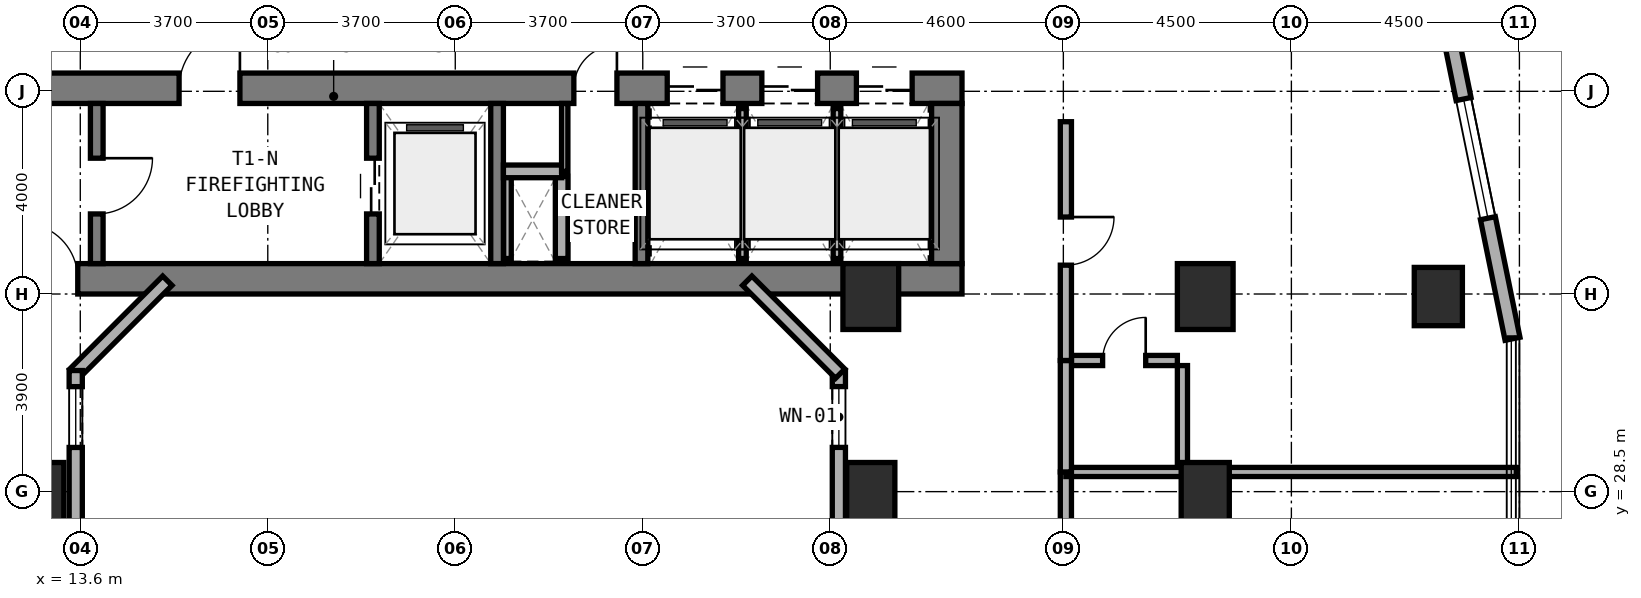
"""IFC4 building model, lengths in metres.
Left out: names, types, materials, properties, quantities, classifications, styles, units other than length and angle.
Written with IfcOpenShell. Run it as: python <this file> out.ifc"""

import sys

from ifc_helpers import new_model, si_unit, direction, frame, frame_2d, origin, origin_2d, place, context, subcontext, project, spatial, rectangle, extrude, element, fill, save


model = new_model("IFC4")
c1 = context("Model", 3, precision=1e-05, world=origin(), true_north=direction((0.0, 1.0)))
c2 = subcontext(c1, "Body", "Model", "MODEL_VIEW")
j1 = project(units=[si_unit("LENGTHUNIT", "METRE"), si_unit("PLANEANGLEUNIT", "RADIAN")], contexts=[c1])
p1 = place(None, origin())
s1 = spatial("IfcSite", under=j1, at=p1, CompositionType="ELEMENT")
p2 = place(p1, origin())
s2 = spatial("IfcBuilding", under=s1, at=p2, CompositionType="ELEMENT")
p3 = place(p2, frame((0.0, 0.0, 48.5)))
s3 = spatial("IfcBuildingStorey", under=s2, at=p3, CompositionType="ELEMENT", Elevation=48.5)
p4 = place(p3, frame((6.2, 32.7, 0.0), z_axis=(0.0, 0.0, 1.0), x_axis=(1.0, 0.0, 0.0)))
e1 = element("IfcWall", 1, at=p4, inside=s3, PredefinedType="SHEAR", context=c2, shape_type="SweptSolid", body=[
    extrude(rectangle(XDim=24.8, YDim=0.6, at=frame_2d((12.4, 0.0))), origin(), (0.0, 0.0, 1.0), 3.5),
])
p5 = place(p4, frame((6.25, 0.0, 0.0)))
e2 = element("IfcOpeningElement", 2, at=p5, cuts=e1, PredefinedType="OPENING", context=c2, shape_type="SweptSolid", body=[
    extrude(rectangle(XDim=1.1, YDim=2.15, at=frame_2d((0.55, 1.075))), frame((0.0, 0.31, 0.0), z_axis=(0.0, -1.0, 0.0), x_axis=(1.0, 0.0, 0.0)), (0.0, 0.0, 1.0), 0.62),
])
p6 = place(p3, frame((6.2, 36.46, 0.0), z_axis=(0.0, 0.0, 1.0), x_axis=(1.0, 0.0, 0.0)))
e3 = element("IfcWall", 3, at=p6, inside=s3, PredefinedType="SHEAR", context=c2, shape_type="SweptSolid", body=[
    extrude(rectangle(XDim=24.8, YDim=0.6, at=frame_2d((12.4, 0.0))), origin(), (0.0, 0.0, 1.0), 3.5),
])
p7 = place(p6, frame((9.35, 0.0, 0.0)))
e4 = element("IfcOpeningElement", 4, at=p7, cuts=e3, PredefinedType="OPENING", context=c2, shape_type="SweptSolid", body=[
    extrude(rectangle(XDim=1.2, YDim=2.15, at=frame_2d((0.6, 1.075))), frame((0.0, 0.31, 0.0), z_axis=(0.0, -1.0, 0.0), x_axis=(1.0, 0.0, 0.0)), (0.0, 0.0, 1.0), 0.62),
])
p8 = place(p6, frame((17.14, 0.0, 0.0)))
e5 = element("IfcOpeningElement", 5, at=p8, cuts=e3, PredefinedType="OPENING", context=c2, shape_type="SweptSolid", body=[
    extrude(rectangle(XDim=0.85, YDim=2.1, at=frame_2d((0.425, 1.05))), frame((0.0, 0.31, 0.0), z_axis=(0.0, -1.0, 0.0), x_axis=(1.0, 0.0, 0.0)), (0.0, 0.0, 1.0), 0.62),
])
p9 = place(p6, frame((18.983, 0.0, 0.0)))
e6 = element("IfcOpeningElement", 6, at=p9, cuts=e3, PredefinedType="OPENING", context=c2, shape_type="SweptSolid", body=[
    extrude(rectangle(XDim=1.1, YDim=2.15, at=frame_2d((0.55, 1.075))), frame((0.0, 0.31, 0.0), z_axis=(0.0, -1.0, 0.0), x_axis=(1.0, 0.0, 0.0)), (0.0, 0.0, 1.0), 0.62),
])
p10 = place(p6, frame((20.85, 0.0, 0.0)))
e7 = element("IfcOpeningElement", 7, at=p10, cuts=e3, PredefinedType="OPENING", context=c2, shape_type="SweptSolid", body=[
    extrude(rectangle(XDim=1.1, YDim=2.15, at=frame_2d((0.55, 1.075))), frame((0.0, 0.31, 0.0), z_axis=(0.0, -1.0, 0.0), x_axis=(1.0, 0.0, 0.0)), (0.0, 0.0, 1.0), 0.62),
])
p11 = place(p6, frame((22.716, 0.0, 0.0)))
e8 = element("IfcOpeningElement", 8, at=p11, cuts=e3, PredefinedType="OPENING", context=c2, shape_type="SweptSolid", body=[
    extrude(rectangle(XDim=1.1, YDim=2.15, at=frame_2d((0.55, 1.075))), frame((0.0, 0.31, 0.0), z_axis=(0.0, -1.0, 0.0), x_axis=(1.0, 0.0, 0.0)), (0.0, 0.0, 1.0), 0.62),
])
p12 = place(p3, frame((30.7, 33.0, 0.0), z_axis=(0.0, 0.0, 1.0), x_axis=(0.0, 1.0, 0.0)))
e9 = element("IfcWall", 9, at=p12, inside=s3, PredefinedType="SHEAR", context=c2, shape_type="SweptSolid", body=[
    extrude(rectangle(XDim=3.16, YDim=0.6, at=frame_2d((1.58, 0.0))), origin(), (0.0, 0.0, 1.0), 3.5),
])
p13 = place(p3, frame((13.925, 33.0, 0.0), z_axis=(0.0, 0.0, 1.0), x_axis=(0.0, 1.0, 0.0)))
e10 = element("IfcWall", 10, at=p13, inside=s3, PredefinedType="STANDARD", context=c2, shape_type="SweptSolid", body=[
    extrude(rectangle(XDim=3.16, YDim=0.25, at=frame_2d((1.58, 0.0))), origin(), (0.0, 0.0, 1.0), 3.22),
])
p14 = place(p13, frame((0.98, 0.0, 0.0)))
e11 = element("IfcOpeningElement", 11, at=p14, cuts=e10, PredefinedType="OPENING", context=c2, shape_type="SweptSolid", body=[
    extrude(rectangle(XDim=1.1, YDim=2.15, at=frame_2d((0.55, 1.075))), frame((0.0, 0.135, 0.0), z_axis=(0.0, -1.0, 0.0), x_axis=(1.0, 0.0, 0.0)), (0.0, 0.0, 1.0), 0.27),
])
p15 = place(p3, frame((19.375, 33.0, 0.0), z_axis=(0.0, 0.0, 1.0), x_axis=(0.0, 1.0, 0.0)))
e12 = element("IfcWall", 12, at=p15, inside=s3, PredefinedType="STANDARD", context=c2, shape_type="SweptSolid", body=[
    extrude(rectangle(XDim=3.16, YDim=0.25, at=frame_2d((1.58, 0.0))), origin(), (0.0, 0.0, 1.0), 3.22),
])
p16 = place(p15, frame((0.98, 0.0, 0.0)))
e13 = element("IfcOpeningElement", 13, at=p16, cuts=e12, PredefinedType="OPENING", context=c2, shape_type="SweptSolid", body=[
    extrude(rectangle(XDim=1.1, YDim=2.15, at=frame_2d((0.55, 1.075))), frame((0.0, 0.135, 0.0), z_axis=(0.0, -1.0, 0.0), x_axis=(1.0, 0.0, 0.0)), (0.0, 0.0, 1.0), 0.27),
])
for number, where, z_axis, x_axis in (
    (14, (21.825, 33.0, 0.0), (0.0, 0.0, 1.0), (0.0, 1.0, 0.0)),
    (15, (24.675, 33.0, 0.0), (0.0, 0.0, 1.0), (0.0, 1.0, 0.0)),
):
    element("IfcWall", number, at=place(p3, frame(where, z_axis=z_axis, x_axis=x_axis)), inside=s3, PredefinedType="STANDARD", context=c2, shape_type="SweptSolid", body=[
        extrude(rectangle(XDim=3.16, YDim=0.25, at=frame_2d((1.58, 0.0))), origin(), (0.0, 0.0, 1.0), 3.22),
    ])
p17 = place(p3, frame((35.8, 28.5, 0.0), z_axis=(0.0, 0.0, 1.0), x_axis=(1.0, 0.0, 0.0)))
e16 = element("IfcColumn", 16, at=p17, inside=s3, PredefinedType="COLUMN", context=c2, shape_type="SweptSolid", body=[
    extrude(rectangle(XDim=0.95, YDim=1.15, at=origin_2d()), origin(), (0.0, 0.0, 1.0), 3.5),
])
p18 = place(p3, frame((35.8, 32.35, 0.0), z_axis=(0.0, 0.0, 1.0), x_axis=(1.0, 0.0, 0.0)))
e17 = element("IfcColumn", 17, at=p18, inside=s3, PredefinedType="COLUMN", context=c2, shape_type="SweptSolid", body=[
    extrude(rectangle(XDim=1.1, YDim=1.3, at=origin_2d()), origin(), (0.0, 0.0, 1.0), 3.5),
])
p19 = place(p3, frame((12.8, 28.5, 0.0), z_axis=(0.0, 0.0, 1.0), x_axis=(1.0, 0.0, 0.0)))
e18 = element("IfcColumn", 18, at=p19, inside=s3, PredefinedType="COLUMN", context=c2, shape_type="SweptSolid", body=[
    extrude(rectangle(XDim=0.95, YDim=1.15, at=origin_2d()), origin(), (0.0, 0.0, 1.0), 3.5),
])
p20 = place(p3, frame((29.2, 32.35, 0.0), z_axis=(0.0, 0.0, 1.0), x_axis=(1.0, 0.0, 0.0)))
e19 = element("IfcColumn", 19, at=p20, inside=s3, PredefinedType="COLUMN", context=c2, shape_type="SweptSolid", body=[
    extrude(rectangle(XDim=1.1, YDim=1.3, at=origin_2d()), origin(), (0.0, 0.0, 1.0), 3.5),
])
for number, where, z_axis, x_axis in (
    (20, (29.2, 28.5, 0.0), (0.0, 0.0, 1.0), (1.0, 0.0, 0.0)),
    (21, (40.4, 32.35, 0.0), (0.0, 0.0, 1.0), (1.0, 0.0, 0.0)),
):
    element("IfcColumn", number, at=place(p3, frame(where, z_axis=z_axis, x_axis=x_axis)), inside=s3, PredefinedType="COLUMN", context=c2, shape_type="SweptSolid", body=[
        extrude(rectangle(XDim=0.95, YDim=1.15, at=origin_2d()), origin(), (0.0, 0.0, 1.0), 3.5),
    ])
p21 = place(p3, frame((41.864, 31.516, 0.0), z_axis=(0.0, 0.0, 1.0), x_axis=(-0.199990901713, 0.979797754249, 0.0)))
e22 = element("IfcWall", 22, at=p21, inside=s3, PredefinedType="STANDARD", context=c2, shape_type="SweptSolid", body=[
    extrude(rectangle(XDim=10.065, YDim=0.3, at=frame_2d((5.033, 0.0))), origin(), (0.0, 0.0, 1.0), 3.22),
])
p22 = place(p21, frame((2.429, 0.0, 0.8)))
e23 = element("IfcOpeningElement", 23, at=p22, cuts=e22, PredefinedType="OPENING", context=c2, shape_type="SweptSolid", body=[
    extrude(rectangle(XDim=2.4, YDim=1.6, at=frame_2d((1.2, 0.8))), frame((0.0, 0.16, 0.0), z_axis=(0.0, -1.0, 0.0), x_axis=(1.0, 0.0, 0.0)), (0.0, 0.0, 1.0), 0.32),
])
p23 = place(p21, frame((7.887, 0.0, 0.85)))
e24 = element("IfcOpeningElement", 24, at=p23, cuts=e22, PredefinedType="OPENING", context=c2, shape_type="SweptSolid", body=[
    extrude(rectangle(XDim=1.8, YDim=1.5, at=frame_2d((0.9, 0.75))), frame((0.0, 0.16, 0.0), z_axis=(0.0, -1.0, 0.0), x_axis=(1.0, 0.0, 0.0)), (0.0, 0.0, 1.0), 0.32),
])
p24 = place(p3, frame((28.57, 19.11, 0.0), z_axis=(0.0, 0.0, 1.0), x_axis=(0.0, 1.0, 0.0)))
e25 = element("IfcWall", 25, at=p24, inside=s3, PredefinedType="STANDARD", context=c2, shape_type="SweptSolid", body=[
    extrude(rectangle(XDim=11.78, YDim=0.26, at=frame_2d((5.89, 0.0))), origin(), (0.0, 0.0, 1.0), 3.22),
])
p25 = place(p24, frame((0.318, 0.0, 0.85)))
e26 = element("IfcOpeningElement", 26, at=p25, cuts=e25, PredefinedType="OPENING", context=c2, shape_type="SweptSolid", body=[
    extrude(rectangle(XDim=1.2, YDim=1.5, at=frame_2d((0.6, 0.75))), frame((0.0, 0.14, 0.0), z_axis=(0.0, -1.0, 0.0), x_axis=(1.0, 0.0, 0.0)), (0.0, 0.0, 1.0), 0.28),
])
p26 = place(p24, frame((4.99, 0.0, 0.85)))
e27 = element("IfcOpeningElement", 27, at=p26, cuts=e25, PredefinedType="OPENING", context=c2, shape_type="SweptSolid", body=[
    extrude(rectangle(XDim=1.8, YDim=1.5, at=frame_2d((0.9, 0.75))), frame((0.0, 0.14, 0.0), z_axis=(0.0, -1.0, 0.0), x_axis=(1.0, 0.0, 0.0)), (0.0, 0.0, 1.0), 0.28),
])
p27 = place(p24, frame((10.263, 0.0, 0.85)))
e28 = element("IfcOpeningElement", 28, at=p27, cuts=e25, PredefinedType="OPENING", context=c2, shape_type="SweptSolid", body=[
    extrude(rectangle(XDim=1.2, YDim=1.5, at=frame_2d((0.6, 0.75))), frame((0.0, 0.14, 0.0), z_axis=(0.0, -1.0, 0.0), x_axis=(1.0, 0.0, 0.0)), (0.0, 0.0, 1.0), 0.28),
])
p28 = place(p3, frame((28.596, 30.828, 0.0), z_axis=(0.0, 0.0, 1.0), x_axis=(-0.707059717605, 0.707153841636, 0.0)))
e29 = element("IfcWall", 29, at=p28, inside=s3, PredefinedType="STANDARD", context=c2, shape_type="SweptSolid", body=[
    extrude(rectangle(XDim=2.594, YDim=0.26, at=frame_2d((1.297, 0.0))), origin(), (0.0, 0.0, 1.0), 3.22),
])
p29 = place(p3, frame((15.318, 32.662, 0.0), z_axis=(0.0, 0.0, 1.0), x_axis=(-0.707106781187, -0.707106781187, 0.0)))
e30 = element("IfcWall", 30, at=p29, inside=s3, PredefinedType="STANDARD", context=c2, shape_type="SweptSolid", body=[
    extrude(rectangle(XDim=2.594, YDim=0.26, at=frame_2d((1.297, 0.0))), origin(), (0.0, 0.0, 1.0), 3.22),
])
p30 = place(p3, frame((13.51, 30.89, 0.0), z_axis=(0.0, 0.0, 1.0), x_axis=(0.0, -1.0, 0.0)))
e31 = element("IfcWall", 31, at=p30, inside=s3, PredefinedType="STANDARD", context=c2, shape_type="SweptSolid", body=[
    extrude(rectangle(XDim=11.78, YDim=0.26, at=frame_2d((5.89, 0.0))), origin(), (0.0, 0.0, 1.0), 3.22),
])
p31 = place(p30, frame((0.318, 0.0, 0.85)))
e32 = element("IfcOpeningElement", 32, at=p31, cuts=e31, PredefinedType="OPENING", context=c2, shape_type="SweptSolid", body=[
    extrude(rectangle(XDim=1.2, YDim=1.5, at=frame_2d((0.6, 0.75))), frame((0.0, 0.14, 0.0), z_axis=(0.0, -1.0, 0.0), x_axis=(1.0, 0.0, 0.0)), (0.0, 0.0, 1.0), 0.28),
])
p32 = place(p30, frame((4.99, 0.0, 0.85)))
e33 = element("IfcOpeningElement", 33, at=p32, cuts=e31, PredefinedType="OPENING", context=c2, shape_type="SweptSolid", body=[
    extrude(rectangle(XDim=1.8, YDim=1.5, at=frame_2d((0.9, 0.75))), frame((0.0, 0.14, 0.0), z_axis=(0.0, -1.0, 0.0), x_axis=(1.0, 0.0, 0.0)), (0.0, 0.0, 1.0), 0.28),
])
p33 = place(p30, frame((10.263, 0.0, 0.85)))
e34 = element("IfcOpeningElement", 34, at=p33, cuts=e31, PredefinedType="OPENING", context=c2, shape_type="SweptSolid", body=[
    extrude(rectangle(XDim=1.2, YDim=1.5, at=frame_2d((0.6, 0.75))), frame((0.0, 0.14, 0.0), z_axis=(0.0, -1.0, 0.0), x_axis=(1.0, 0.0, 0.0)), (0.0, 0.0, 1.0), 0.28),
])
p34 = place(p3, frame((22.03, 33.1, 0.0), z_axis=(0.0, 0.0, 1.0), x_axis=(0.0, 1.0, 0.0)))
e35 = element("IfcWall", 35, at=p34, inside=s3, PredefinedType="PARTITIONING", context=c2, shape_type="SweptSolid", body=[
    extrude(rectangle(XDim=1.62, YDim=0.15, at=frame_2d((0.81, 0.0))), origin(), (0.0, 0.0, 1.0), 3.22),
])
p35 = place(p3, frame((23.1, 33.1, 0.0), z_axis=(0.0, 0.0, 1.0), x_axis=(0.0, 1.0, 0.0)))
e36 = element("IfcWall", 36, at=p35, inside=s3, PredefinedType="SOLIDWALL", context=c2, shape_type="SweptSolid", body=[
    extrude(rectangle(XDim=1.62, YDim=0.25, at=frame_2d((0.81, 0.0))), origin(), (0.0, 0.0, 1.0), 3.22),
])
p36 = place(p3, frame((21.95, 34.82, 0.0), z_axis=(0.0, 0.0, 1.0), x_axis=(1.0, 0.0, 0.0)))
e37 = element("IfcWall", 37, at=p36, inside=s3, PredefinedType="SOLIDWALL", context=c2, shape_type="SweptSolid", body=[
    extrude(rectangle(XDim=1.15, YDim=0.25, at=frame_2d((0.575, 0.0))), origin(), (0.0, 0.0, 1.0), 3.22),
])
p37 = place(p3, frame((23.16, 34.82, 0.0), z_axis=(0.0, 0.0, 1.0), x_axis=(0.0, 1.0, 0.0)))
e38 = element("IfcWall", 38, at=p37, inside=s3, PredefinedType="PARTITIONING", context=c2, shape_type="SweptSolid", body=[
    extrude(rectangle(XDim=1.34, YDim=0.125, at=frame_2d((0.67, 0.0))), origin(), (0.0, 0.0, 1.0), 3.22),
])
p38 = place(p3, frame((26.667, 33.1, 0.0), z_axis=(0.0, 0.0, 1.0), x_axis=(0.0, 1.0, 0.0)))
e39 = element("IfcWall", 39, at=p38, inside=s3, PredefinedType="PARTITIONING", context=c2, shape_type="SweptSolid", body=[
    extrude(rectangle(XDim=2.96, YDim=0.15, at=frame_2d((1.48, 0.0))), origin(), (0.0, 0.0, 1.0), 3.22),
])
p39 = place(p3, frame((28.533, 33.1, 0.0), z_axis=(0.0, 0.0, 1.0), x_axis=(0.0, 1.0, 0.0)))
e40 = element("IfcWall", 40, at=p39, inside=s3, PredefinedType="PARTITIONING", context=c2, shape_type="SweptSolid", body=[
    extrude(rectangle(XDim=2.96, YDim=0.15, at=frame_2d((1.48, 0.0))), origin(), (0.0, 0.0, 1.0), 2.395),
])
p40 = place(p3, frame((33.05, 23.744, 0.0), z_axis=(0.0, 0.0, 1.0), x_axis=(0.0, 1.0, 0.0)))
e41 = element("IfcWall", 41, at=p40, inside=s3, PredefinedType="SOLIDWALL", context=c2, shape_type="SweptSolid", body=[
    extrude(rectangle(XDim=5.144, YDim=0.22, at=frame_2d((2.572, 0.0))), origin(), (0.0, 0.0, 1.0), 2.395),
])
p41 = place(p40, frame((2.097, 0.0, 0.0)))
e42 = element("IfcOpeningElement", 42, at=p41, cuts=e41, PredefinedType="OPENING", context=c2, shape_type="SweptSolid", body=[
    extrude(rectangle(XDim=0.95, YDim=2.1, at=frame_2d((0.475, 1.05))), frame((0.0, 0.12, 0.0), z_axis=(0.0, -1.0, 0.0), x_axis=(1.0, 0.0, 0.0)), (0.0, 0.0, 1.0), 0.24),
])
p42 = place(p3, frame((33.05, 28.888, 0.0), z_axis=(0.0, 0.0, 1.0), x_axis=(1.0, 0.0, 0.0)))
e43 = element("IfcWall", 43, at=p42, inside=s3, PredefinedType="SOLIDWALL", context=c2, shape_type="SweptSolid", body=[
    extrude(rectangle(XDim=8.89, YDim=0.18, at=frame_2d((4.445, 0.0))), origin(), (0.0, 0.0, 1.0), 2.745),
])
p43 = place(p3, frame((33.15, 31.088, 0.0), z_axis=(0.0, 0.0, 1.0), x_axis=(1.0, 0.0, 0.0)))
e44 = element("IfcWall", 44, at=p43, inside=s3, PredefinedType="PLUMBINGWALL", context=c2, shape_type="SweptSolid", body=[
    extrude(rectangle(XDim=2.1, YDim=0.2, at=frame_2d((1.05, 0.0))), origin(), (0.0, 0.0, 1.0), 3.22),
])
p44 = place(p43, frame((0.625, 0.0, 0.0)))
e45 = element("IfcOpeningElement", 45, at=p44, cuts=e44, PredefinedType="OPENING", context=c2, shape_type="SweptSolid", body=[
    extrude(rectangle(XDim=0.85, YDim=2.1, at=frame_2d((0.425, 1.05))), frame((0.0, 0.11, 0.0), z_axis=(0.0, -1.0, 0.0), x_axis=(1.0, 0.0, 0.0)), (0.0, 0.0, 1.0), 0.22),
])
p45 = place(p3, frame((35.35, 28.988, 0.0), z_axis=(0.0, 0.0, 1.0), x_axis=(0.0, 1.0, 0.0)))
e46 = element("IfcWall", 46, at=p45, inside=s3, PredefinedType="PLUMBINGWALL", context=c2, shape_type="SweptSolid", body=[
    extrude(rectangle(XDim=2.0, YDim=0.2, at=frame_2d((1.0, 0.0))), origin(), (0.0, 0.0, 1.0), 3.22),
])
p46 = place(p3, frame((33.05, 28.888, 0.0), z_axis=(0.0, 0.0, 1.0), x_axis=(0.0, 1.0, 0.0)))
e47 = element("IfcWall", 47, at=p46, inside=s3, PredefinedType="SOLIDWALL", context=c2, shape_type="SweptSolid", body=[
    extrude(rectangle(XDim=2.2, YDim=0.22, at=frame_2d((1.1, 0.0))), origin(), (0.0, 0.0, 1.0), 3.22),
])
p47 = place(p3, frame((33.05, 31.088, 0.0), z_axis=(0.0, 0.0, 1.0), x_axis=(0.0, 1.0, 0.0)))
e48 = element("IfcWall", 48, at=p47, inside=s3, PredefinedType="SOLIDWALL", context=c2, shape_type="SweptSolid", body=[
    extrude(rectangle(XDim=4.712, YDim=0.22, at=frame_2d((2.356, 0.0))), origin(), (0.0, 0.0, 1.0), 2.395),
])
p48 = place(p47, frame((1.881, 0.0, 0.0)))
e49 = element("IfcOpeningElement", 49, at=p48, cuts=e48, PredefinedType="OPENING", context=c2, shape_type="SweptSolid", body=[
    extrude(rectangle(XDim=0.95, YDim=2.1, at=frame_2d((0.475, 1.05))), frame((0.0, 0.12, 0.0), z_axis=(0.0, -1.0, 0.0), x_axis=(1.0, 0.0, 0.0)), (0.0, 0.0, 1.0), 0.24),
])
p49 = place(p22, origin())
e50 = element("IfcWindow", 50, at=p49, inside=s3, PartitioningType="SINGLE_PANEL", PredefinedType="WINDOW", context=c2, shape_type="SweptSolid", body=[
    extrude(rectangle(XDim=2.4, YDim=1.6, at=frame_2d((1.2, 0.8))), frame((0.0, 0.03, 0.0), z_axis=(0.0, -1.0, 0.0), x_axis=(1.0, 0.0, 0.0)), (0.0, 0.0, 1.0), 0.06),
])
fill(e23, e50)
p50 = place(p27, origin())
e51 = element("IfcWindow", 51, at=p50, inside=s3, PartitioningType="SINGLE_PANEL", PredefinedType="WINDOW", context=c2, shape_type="SweptSolid", body=[
    extrude(rectangle(XDim=1.2, YDim=1.5, at=frame_2d((0.6, 0.75))), frame((0.0, 0.03, 0.0), z_axis=(0.0, -1.0, 0.0), x_axis=(1.0, 0.0, 0.0)), (0.0, 0.0, 1.0), 0.06),
])
fill(e28, e51)
p51 = place(p31, origin())
e52 = element("IfcWindow", 52, at=p51, inside=s3, PartitioningType="SINGLE_PANEL", PredefinedType="WINDOW", context=c2, shape_type="SweptSolid", body=[
    extrude(rectangle(XDim=1.2, YDim=1.5, at=frame_2d((0.6, 0.75))), frame((0.0, 0.03, 0.0), z_axis=(0.0, -1.0, 0.0), x_axis=(1.0, 0.0, 0.0)), (0.0, 0.0, 1.0), 0.06),
])
fill(e32, e52)
p52 = place(p14, frame((1.1, 0.0, 0.0), z_axis=(0.0, 0.0, 1.0), x_axis=(-1.0, 0.0, 0.0)))
e53 = element("IfcDoor", 53, at=p52, inside=s3, OperationType="SINGLE_SWING_LEFT", PredefinedType="DOOR", context=c2, shape_type="SweptSolid", body=[
    extrude(rectangle(XDim=1.1, YDim=2.15, at=frame_2d((0.55, 1.075))), frame((0.0, 0.025, 0.0), z_axis=(0.0, -1.0, 0.0), x_axis=(1.0, 0.0, 0.0)), (0.0, 0.0, 1.0), 0.05),
])
fill(e11, e53)
p53 = place(p7, origin())
e54 = element("IfcDoor", 54, at=p53, inside=s3, OperationType="SINGLE_SWING_RIGHT", PredefinedType="DOOR", context=c2, shape_type="SweptSolid", body=[
    extrude(rectangle(XDim=1.2, YDim=2.15, at=frame_2d((0.6, 1.075))), frame((0.0, 0.025, 0.0), z_axis=(0.0, -1.0, 0.0), x_axis=(1.0, 0.0, 0.0)), (0.0, 0.0, 1.0), 0.05),
])
fill(e4, e54)
p54 = place(p16, origin())
e55 = element("IfcDoor", 55, at=p54, inside=s3, OperationType="DOUBLE_DOOR_SLIDING", PredefinedType="DOOR", context=c2, shape_type="SweptSolid", body=[
    extrude(rectangle(XDim=1.1, YDim=2.15, at=frame_2d((0.55, 1.075))), frame((0.0, 0.025, 0.0), z_axis=(0.0, -1.0, 0.0), x_axis=(1.0, 0.0, 0.0)), (0.0, 0.0, 1.0), 0.05),
])
fill(e13, e55)
p55 = place(p8, origin())
e56 = element("IfcDoor", 56, at=p55, inside=s3, OperationType="SINGLE_SWING_RIGHT", PredefinedType="DOOR", context=c2, shape_type="SweptSolid", body=[
    extrude(rectangle(XDim=0.85, YDim=2.1, at=frame_2d((0.425, 1.05))), frame((0.0, 0.025, 0.0), z_axis=(0.0, -1.0, 0.0), x_axis=(1.0, 0.0, 0.0)), (0.0, 0.0, 1.0), 0.05),
])
fill(e5, e56)
p56 = place(p9, origin())
e57 = element("IfcDoor", 57, at=p56, inside=s3, OperationType="DOUBLE_DOOR_SLIDING", PredefinedType="DOOR", context=c2, shape_type="SweptSolid", body=[
    extrude(rectangle(XDim=1.1, YDim=2.15, at=frame_2d((0.55, 1.075))), frame((0.0, 0.025, 0.0), z_axis=(0.0, -1.0, 0.0), x_axis=(1.0, 0.0, 0.0)), (0.0, 0.0, 1.0), 0.05),
])
fill(e6, e57)
p57 = place(p10, origin())
e58 = element("IfcDoor", 58, at=p57, inside=s3, OperationType="DOUBLE_DOOR_SLIDING", PredefinedType="DOOR", context=c2, shape_type="SweptSolid", body=[
    extrude(rectangle(XDim=1.1, YDim=2.15, at=frame_2d((0.55, 1.075))), frame((0.0, 0.025, 0.0), z_axis=(0.0, -1.0, 0.0), x_axis=(1.0, 0.0, 0.0)), (0.0, 0.0, 1.0), 0.05),
])
fill(e7, e58)
p58 = place(p11, origin())
e59 = element("IfcDoor", 59, at=p58, inside=s3, OperationType="DOUBLE_DOOR_SLIDING", PredefinedType="DOOR", context=c2, shape_type="SweptSolid", body=[
    extrude(rectangle(XDim=1.1, YDim=2.15, at=frame_2d((0.55, 1.075))), frame((0.0, 0.025, 0.0), z_axis=(0.0, -1.0, 0.0), x_axis=(1.0, 0.0, 0.0)), (0.0, 0.0, 1.0), 0.05),
])
fill(e8, e59)
p59 = place(p5, origin())
e60 = element("IfcDoor", 60, at=p59, inside=s3, OperationType="SINGLE_SWING_LEFT", PredefinedType="DOOR", context=c2, shape_type="SweptSolid", body=[
    extrude(rectangle(XDim=1.1, YDim=2.15, at=frame_2d((0.55, 1.075))), frame((0.0, 0.025, 0.0), z_axis=(0.0, -1.0, 0.0), x_axis=(1.0, 0.0, 0.0)), (0.0, 0.0, 1.0), 0.05),
])
fill(e2, e60)
p60 = place(p44, origin())
e61 = element("IfcDoor", 61, at=p60, inside=s3, OperationType="SINGLE_SWING_RIGHT", PredefinedType="DOOR", context=c2, shape_type="SweptSolid", body=[
    extrude(rectangle(XDim=0.85, YDim=2.1, at=frame_2d((0.425, 1.05))), frame((0.0, 0.025, 0.0), z_axis=(0.0, -1.0, 0.0), x_axis=(1.0, 0.0, 0.0)), (0.0, 0.0, 1.0), 0.05),
])
fill(e45, e61)
p61 = place(p48, frame((0.95, 0.0, 0.0), z_axis=(0.0, 0.0, 1.0), x_axis=(-1.0, 0.0, 0.0)))
e62 = element("IfcDoor", 62, at=p61, inside=s3, OperationType="SINGLE_SWING_LEFT", PredefinedType="DOOR", context=c2, shape_type="SweptSolid", body=[
    extrude(rectangle(XDim=0.95, YDim=2.1, at=frame_2d((0.475, 1.05))), frame((0.0, 0.025, 0.0), z_axis=(0.0, -1.0, 0.0), x_axis=(1.0, 0.0, 0.0)), (0.0, 0.0, 1.0), 0.05),
])
fill(e49, e62)
save(model, sys.argv[1])
